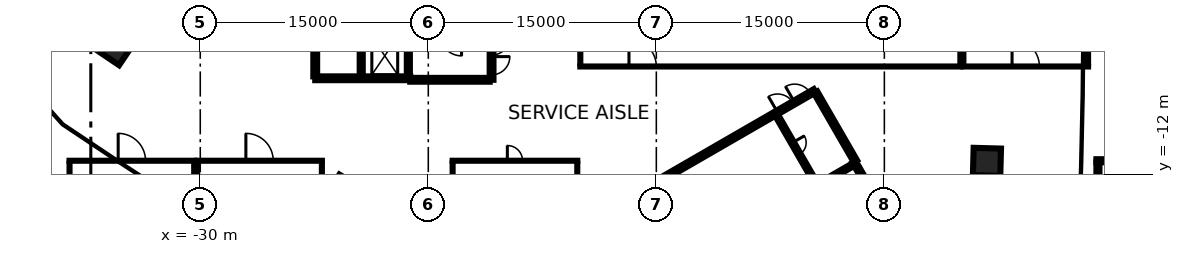
"""IFC4 building model, lengths in metres.
Left out: names, types, materials, properties, quantities, classifications, styles, units other than length and angle.
Written with IfcOpenShell. Run it as: python <this file> out.ifc"""

import sys

from ifc_helpers import new_model, si_unit, direction, frame, frame_2d, origin, origin_2d, place, context, subcontext, project, spatial, rectangle, extrude, element, fill, save


model = new_model("IFC4")
c1 = context("Model", 3, precision=1e-05, world=origin(), true_north=direction((0.0, 1.0)))
c2 = subcontext(c1, "Body", "Model", "MODEL_VIEW")
j1 = project(units=[si_unit("LENGTHUNIT", "METRE"), si_unit("PLANEANGLEUNIT", "RADIAN")], contexts=[c1])
p1 = place(None, origin())
s1 = spatial("IfcSite", under=j1, at=p1, CompositionType="ELEMENT")
p2 = place(p1, origin())
s2 = spatial("IfcBuilding", under=s1, at=p2, CompositionType="ELEMENT")
p3 = place(p2, frame((0.0, 0.0, -12.0)))
s3 = spatial("IfcBuildingStorey", under=s2, at=p3, CompositionType="ELEMENT", Elevation=-12.0)
for number, where, z_axis, x_axis in (
    (1, (21.749, -11.174, 0.0), (0.0, 0.0, 1.0), (-1.0, 0.027, 0.0)),
    (2, (-35.583, -3.565, 0.0), (0.0, 0.0, 1.0), (0.559, 0.829, 0.0)),
):
    element("IfcColumn", number, at=place(p3, frame(where, z_axis=z_axis, x_axis=x_axis)), inside=s3, PredefinedType="COLUMN", context=c2, shape_type="SweptSolid", body=[
        extrude(rectangle(XDim=1.8, YDim=1.8, at=origin_2d()), origin(), (0.0, 0.0, 1.0), 4.4),
    ])
p4 = place(p3, frame((-10.837, 5.775, 0.0), z_axis=(0.0, 0.0, 1.0), x_axis=(0.0, -1.0, 0.0)))
e3 = element("IfcWall", 3, at=p4, inside=s3, PredefinedType="SHEAR", context=c2, shape_type="SweptSolid", body=[
    extrude(rectangle(XDim=11.55, YDim=0.25, at=frame_2d((5.775, 0.0))), origin(), (0.0, 0.0, 1.0), 4.4),
])
p5 = place(p4, frame((10.025, 0.0, 0.0)))
e4 = element("IfcOpeningElement", 4, at=p5, cuts=e3, PredefinedType="OPENING", context=c2, shape_type="SweptSolid", body=[
    extrude(rectangle(XDim=1.2, YDim=2.1, at=frame_2d((0.6, 1.05))), frame((0.0, 0.135, 0.0), z_axis=(0.0, -1.0, 0.0), x_axis=(1.0, 0.0, 0.0)), (0.0, 0.0, 1.0), 0.27),
])
p6 = place(p4, frame((8.725, 0.0, 0.0)))
e5 = element("IfcOpeningElement", 5, at=p6, cuts=e3, PredefinedType="OPENING", context=c2, shape_type="SweptSolid", body=[
    extrude(rectangle(XDim=1.2, YDim=2.1, at=frame_2d((0.6, 1.05))), frame((0.0, 0.135, 0.0), z_axis=(0.0, -1.0, 0.0), x_axis=(1.0, 0.0, 0.0)), (0.0, 0.0, 1.0), 0.27),
])
p7 = place(p3, frame((-16.187, -5.675, 0.0), z_axis=(0.0, 0.0, 1.0), x_axis=(-1.0, 0.0, 0.0)))
e6 = element("IfcWall", 6, at=p7, inside=s3, PredefinedType="SHEAR", context=c2, shape_type="SweptSolid", body=[
    extrude(rectangle(XDim=6.25, YDim=0.25, at=frame_2d((3.125, 0.0))), origin(), (0.0, 0.0, 1.0), 4.4),
])
p8 = place(p3, frame((-10.963, -5.775, 0.0), z_axis=(0.0, 0.0, 1.0), x_axis=(-1.0, 0.0, 0.0)))
e7 = element("IfcWall", 7, at=p8, inside=s3, PredefinedType="SHEAR", context=c2, shape_type="SweptSolid", body=[
    extrude(rectangle(XDim=5.225, YDim=0.25, at=frame_2d((2.612, 0.0))), origin(), (0.0, 0.0, 1.0), 4.4),
])
p9 = place(p3, frame((-22.437, -5.55, 0.0), z_axis=(0.0, 0.0, 1.0), x_axis=(0.0, 1.0, 0.0)))
e8 = element("IfcWall", 8, at=p9, inside=s3, PredefinedType="SHEAR", context=c2, shape_type="SweptSolid", body=[
    extrude(rectangle(XDim=1.849, YDim=0.25, at=frame_2d((0.925, 0.0))), origin(), (0.0, 0.0, 1.0), 4.4),
])
p10 = place(p3, frame((-16.312, -2.807, 0.0), z_axis=(0.0, 0.0, 1.0), x_axis=(0.0, -1.0, 0.0)))
e9 = element("IfcWall", 9, at=p10, inside=s3, PredefinedType="SHEAR", context=c2, shape_type="SweptSolid", body=[
    extrude(rectangle(XDim=2.742, YDim=0.2, at=frame_2d((1.371, 0.0))), origin(), (0.0, 0.0, 1.0), 4.4),
])
p11 = place(p10, frame((0.743, 0.0, 0.0)))
e10 = element("IfcOpeningElement", 10, at=p11, cuts=e9, PredefinedType="OPENING", context=c2, shape_type="SweptSolid", body=[
    extrude(rectangle(XDim=1.3, YDim=2.1, at=frame_2d((0.65, 1.05))), frame((0.0, 0.11, 0.0), z_axis=(0.0, -1.0, 0.0), x_axis=(1.0, 0.0, 0.0)), (0.0, 0.0, 1.0), 0.22),
])
p12 = place(p3, frame((-19.412, -5.549, 0.0), z_axis=(0.0, 0.0, 1.0), x_axis=(0.0, 1.0, 0.0)))
e11 = element("IfcWall", 11, at=p12, inside=s3, PredefinedType="SHEAR", context=c2, shape_type="SweptSolid", body=[
    extrude(rectangle(XDim=2.799, YDim=0.2, at=frame_2d((1.399, 0.0))), origin(), (0.0, 0.0, 1.0), 4.4),
])
p13 = place(p3, frame((0.417, -12.273, 0.0), z_axis=(0.0, 0.0, 1.0), x_axis=(0.866021906294, 0.500006057782, 0.0)))
e12 = element("IfcWall", 12, at=p13, inside=s3, PredefinedType="SHEAR", context=c2, shape_type="SweptSolid", body=[
    extrude(rectangle(XDim=11.55, YDim=0.25, at=frame_2d((5.775, 0.0))), origin(), (0.0, 0.0, 1.0), 4.4),
])
p14 = place(p13, frame((10.025, 0.0, 0.0)))
e13 = element("IfcOpeningElement", 13, at=p14, cuts=e12, PredefinedType="OPENING", context=c2, shape_type="SweptSolid", body=[
    extrude(rectangle(XDim=1.2, YDim=2.1, at=frame_2d((0.6, 1.05))), frame((0.0, 0.135, 0.0), z_axis=(0.0, -1.0, 0.0), x_axis=(1.0, 0.0, 0.0)), (0.0, 0.0, 1.0), 0.27),
])
p15 = place(p13, frame((8.725, 0.0, 0.0)))
e14 = element("IfcOpeningElement", 14, at=p15, cuts=e12, PredefinedType="OPENING", context=c2, shape_type="SweptSolid", body=[
    extrude(rectangle(XDim=1.2, YDim=2.1, at=frame_2d((0.6, 1.05))), frame((0.0, 0.135, 0.0), z_axis=(0.0, -1.0, 0.0), x_axis=(1.0, 0.0, 0.0)), (0.0, 0.0, 1.0), 0.27),
])
p16 = place(p3, frame((13.008, -11.181, 0.0), z_axis=(0.0, 0.0, 1.0), x_axis=(0.500004234368, -0.866022959057, 0.0)))
e15 = element("IfcWall", 15, at=p16, inside=s3, PredefinedType="SHEAR", context=c2, shape_type="SweptSolid", body=[
    extrude(rectangle(XDim=6.25, YDim=0.25, at=frame_2d((3.125, 0.0))), origin(), (0.0, 0.0, 1.0), 4.4),
])
p17 = place(p3, frame((10.483, -6.606, 0.0), z_axis=(0.0, 0.0, 1.0), x_axis=(0.49999885962, -0.866026062182, 0.0)))
e16 = element("IfcWall", 16, at=p17, inside=s3, PredefinedType="SHEAR", context=c2, shape_type="SweptSolid", body=[
    extrude(rectangle(XDim=5.225, YDim=0.25, at=frame_2d((2.612, 0.0))), origin(), (0.0, 0.0, 1.0), 4.4),
])
p18 = place(p3, frame((7.906, -8.094, 0.0), z_axis=(0.0, 0.0, 1.0), x_axis=(0.500012186204, -0.866018367962, 0.0)))
e17 = element("IfcWall", 17, at=p18, inside=s3, PredefinedType="SHEAR", context=c2, shape_type="SweptSolid", body=[
    extrude(rectangle(XDim=5.349, YDim=0.2, at=frame_2d((2.674, 0.0))), origin(), (0.0, 0.0, 1.0), 4.4),
])
p19 = place(p18, frame((2.099, 0.0, 0.0)))
e18 = element("IfcOpeningElement", 18, at=p19, cuts=e17, PredefinedType="OPENING", context=c2, shape_type="SweptSolid", body=[
    extrude(rectangle(XDim=0.9, YDim=2.1, at=frame_2d((0.45, 1.05))), frame((0.0, 0.11, 0.0), z_axis=(0.0, -1.0, 0.0), x_axis=(1.0, 0.0, 0.0)), (0.0, 0.0, 1.0), 0.22),
])
p20 = place(p3, frame((10.668, -12.677, 0.0), z_axis=(0.0, 0.0, 1.0), x_axis=(0.866016748302, 0.500014991436, 0.0)))
e19 = element("IfcWall", 19, at=p20, inside=s3, PredefinedType="SHEAR", context=c2, shape_type="SweptSolid", body=[
    extrude(rectangle(XDim=2.649, YDim=0.2, at=frame_2d((1.324, 0.0))), origin(), (0.0, 0.0, 1.0), 4.4),
])
p21 = place(p20, frame((0.65, 0.0, 0.0)))
e20 = element("IfcOpeningElement", 20, at=p21, cuts=e19, PredefinedType="OPENING", context=c2, shape_type="SweptSolid", body=[
    extrude(rectangle(XDim=1.3, YDim=2.1, at=frame_2d((0.65, 1.05))), frame((0.0, 0.11, 0.0), z_axis=(0.0, -1.0, 0.0), x_axis=(1.0, 0.0, 0.0)), (0.0, 0.0, 1.0), 0.22),
])
p22 = place(p3, frame((-38.7, -11.1, 0.0), z_axis=(0.0, 0.0, 1.0), x_axis=(1.0, 0.0, 0.0)))
e21 = element("IfcWall", 21, at=p22, inside=s3, PredefinedType="PARTITIONING", context=c2, shape_type="SweptSolid", body=[
    extrude(rectangle(XDim=8.4, YDim=0.2, at=frame_2d((4.2, 0.0))), origin(), (0.0, 0.0, 1.0), 4.4),
])
p23 = place(p22, frame((3.3, 0.0, 0.0)))
e22 = element("IfcOpeningElement", 22, at=p23, cuts=e21, PredefinedType="OPENING", context=c2, shape_type="SweptSolid", body=[
    extrude(rectangle(XDim=1.8, YDim=2.1, at=frame_2d((0.9, 1.05))), frame((0.0, 0.11, 0.0), z_axis=(0.0, -1.0, 0.0), x_axis=(1.0, 0.0, 0.0)), (0.0, 0.0, 1.0), 0.22),
])
p24 = place(p3, frame((-38.6, -15.4, 0.0), z_axis=(0.0, 0.0, 1.0), x_axis=(0.0, 1.0, 0.0)))
e23 = element("IfcWall", 23, at=p24, inside=s3, PredefinedType="PARTITIONING", context=c2, shape_type="SweptSolid", body=[
    extrude(rectangle(XDim=4.2, YDim=0.2, at=frame_2d((2.1, 0.0))), origin(), (0.0, 0.0, 1.0), 4.4),
])
p25 = place(p3, frame((-30.4, -15.6, 0.0), z_axis=(0.0, 0.0, 1.0), x_axis=(0.0, 1.0, 0.0)))
e24 = element("IfcWall", 24, at=p25, inside=s3, PredefinedType="PARTITIONING", context=c2, shape_type="SweptSolid", body=[
    extrude(rectangle(XDim=4.4, YDim=0.2, at=frame_2d((2.2, 0.0))), origin(), (0.0, 0.0, 1.0), 4.4),
])
p26 = place(p3, frame((-30.3, -11.1, 0.0), z_axis=(0.0, 0.0, 1.0), x_axis=(1.0, 0.0, 0.0)))
e25 = element("IfcWall", 25, at=p26, inside=s3, PredefinedType="PARTITIONING", context=c2, shape_type="SweptSolid", body=[
    extrude(rectangle(XDim=8.4, YDim=0.2, at=frame_2d((4.2, 0.0))), origin(), (0.0, 0.0, 1.0), 4.4),
])
p27 = place(p26, frame((3.3, 0.0, 0.0)))
e26 = element("IfcOpeningElement", 26, at=p27, cuts=e25, PredefinedType="OPENING", context=c2, shape_type="SweptSolid", body=[
    extrude(rectangle(XDim=1.8, YDim=2.1, at=frame_2d((0.9, 1.05))), frame((0.0, 0.11, 0.0), z_axis=(0.0, -1.0, 0.0), x_axis=(1.0, 0.0, 0.0)), (0.0, 0.0, 1.0), 0.22),
])
p28 = place(p3, frame((-30.2, -15.6, 0.0), z_axis=(0.0, 0.0, 1.0), x_axis=(0.0, 1.0, 0.0)))
e27 = element("IfcWall", 27, at=p28, inside=s3, PredefinedType="PARTITIONING", context=c2, shape_type="SweptSolid", body=[
    extrude(rectangle(XDim=4.4, YDim=0.2, at=frame_2d((2.2, 0.0))), origin(), (0.0, 0.0, 1.0), 4.4),
])
p29 = place(p3, frame((-22.0, -15.4, 0.0), z_axis=(0.0, 0.0, 1.0), x_axis=(0.0, 1.0, 0.0)))
e28 = element("IfcWall", 28, at=p29, inside=s3, PredefinedType="PARTITIONING", context=c2, shape_type="SweptSolid", body=[
    extrude(rectangle(XDim=4.2, YDim=0.2, at=frame_2d((2.1, 0.0))), origin(), (0.0, 0.0, 1.0), 4.4),
])
p30 = place(p3, frame((-13.5, -11.1, 0.0), z_axis=(0.0, 0.0, 1.0), x_axis=(1.0, 0.0, 0.0)))
e29 = element("IfcWall", 29, at=p30, inside=s3, PredefinedType="PARTITIONING", context=c2, shape_type="SweptSolid", body=[
    extrude(rectangle(XDim=8.4, YDim=0.2, at=frame_2d((4.2, 0.0))), origin(), (0.0, 0.0, 1.0), 4.4),
])
p31 = place(p30, frame((3.7, 0.0, 0.0)))
e30 = element("IfcOpeningElement", 30, at=p31, cuts=e29, PredefinedType="OPENING", context=c2, shape_type="SweptSolid", body=[
    extrude(rectangle(XDim=1.0, YDim=2.1, at=frame_2d((0.5, 1.05))), frame((0.0, 0.11, 0.0), z_axis=(0.0, -1.0, 0.0), x_axis=(1.0, 0.0, 0.0)), (0.0, 0.0, 1.0), 0.22),
])
for number, where, z_axis, x_axis in (
    (31, (-13.4, -15.4, 0.0), (0.0, 0.0, 1.0), (0.0, 1.0, 0.0)),
    (32, (-5.2, -15.4, 0.0), (0.0, 0.0, 1.0), (0.0, 1.0, 0.0)),
):
    element("IfcWall", number, at=place(p3, frame(where, z_axis=z_axis, x_axis=x_axis)), inside=s3, PredefinedType="PARTITIONING", context=c2, shape_type="SweptSolid", body=[
        extrude(rectangle(XDim=4.2, YDim=0.2, at=frame_2d((2.1, 0.0))), origin(), (0.0, 0.0, 1.0), 4.4),
    ])
p32 = place(p3, frame((-5.1, -4.9, 0.0), z_axis=(0.0, 0.0, 1.0), x_axis=(1.0, 0.0, 0.0)))
e33 = element("IfcWall", 33, at=p32, inside=s3, PredefinedType="PARTITIONING", context=c2, shape_type="SweptSolid", body=[
    extrude(rectangle(XDim=25.2, YDim=0.2, at=frame_2d((12.6, 0.0))), origin(), (0.0, 0.0, 1.0), 4.4),
])
p33 = place(p32, frame((3.3, 0.0, 0.0)))
e34 = element("IfcOpeningElement", 34, at=p33, cuts=e33, PredefinedType="OPENING", context=c2, shape_type="SweptSolid", body=[
    extrude(rectangle(XDim=1.8, YDim=2.1, at=frame_2d((0.9, 1.05))), frame((0.0, 0.11, 0.0), z_axis=(0.0, -1.0, 0.0), x_axis=(1.0, 0.0, 0.0)), (0.0, 0.0, 1.0), 0.22),
])
for number, where, z_axis, x_axis in (
    (35, (-5.0, -4.8, 0.0), (0.0, 0.0, 1.0), (0.0, 1.0, 0.0)),
    (36, (20.0, -4.8, 0.0), (0.0, 0.0, 1.0), (0.0, 1.0, 0.0)),
):
    element("IfcWall", number, at=place(p3, frame(where, z_axis=z_axis, x_axis=x_axis)), inside=s3, PredefinedType="PARTITIONING", context=c2, shape_type="SweptSolid", body=[
        extrude(rectangle(XDim=4.2, YDim=0.2, at=frame_2d((2.1, 0.0))), origin(), (0.0, 0.0, 1.0), 4.4),
    ])
p34 = place(p3, frame((20.1, -4.9, 0.0), z_axis=(0.0, 0.0, 1.0), x_axis=(1.0, 0.0, 0.0)))
e37 = element("IfcWall", 37, at=p34, inside=s3, PredefinedType="PARTITIONING", context=c2, shape_type="SweptSolid", body=[
    extrude(rectangle(XDim=8.4, YDim=0.2, at=frame_2d((4.2, 0.0))), origin(), (0.0, 0.0, 1.0), 4.4),
])
p35 = place(p34, frame((3.3, 0.0, 0.0)))
e38 = element("IfcOpeningElement", 38, at=p35, cuts=e37, PredefinedType="OPENING", context=c2, shape_type="SweptSolid", body=[
    extrude(rectangle(XDim=1.8, YDim=2.1, at=frame_2d((0.9, 1.05))), frame((0.0, 0.11, 0.0), z_axis=(0.0, -1.0, 0.0), x_axis=(1.0, 0.0, 0.0)), (0.0, 0.0, 1.0), 0.22),
])
p36 = place(p3, frame((20.2, -4.8, 0.0), z_axis=(0.0, 0.0, 1.0), x_axis=(0.0, 1.0, 0.0)))
e39 = element("IfcWall", 39, at=p36, inside=s3, PredefinedType="PARTITIONING", context=c2, shape_type="SweptSolid", body=[
    extrude(rectangle(XDim=4.2, YDim=0.2, at=frame_2d((2.1, 0.0))), origin(), (0.0, 0.0, 1.0), 4.4),
])
p37 = place(p3, frame((28.4, -4.8, 0.0), z_axis=(0.0, 0.0, 1.0), x_axis=(0.0, 1.0, 0.0)))
e40 = element("IfcWall", 40, at=p37, inside=s3, PredefinedType="PARTITIONING", context=c2, shape_type="SweptSolid", body=[
    extrude(rectangle(XDim=4.4, YDim=0.2, at=frame_2d((2.2, 0.0))), origin(), (0.0, 0.0, 1.0), 4.4),
])
p38 = place(p3, frame((29.05, -20.8, 0.0), z_axis=(0.0, 0.0, 1.0), x_axis=(0.0, 1.0, 0.0)))
e41 = element("IfcWall", 41, at=p38, inside=s3, PredefinedType="SOLIDWALL", context=c2, shape_type="SweptSolid", body=[
    extrude(rectangle(XDim=9.6, YDim=0.2, at=frame_2d((4.8, 0.0))), origin(), (0.0, 0.0, 1.0), 4.4),
])
p39 = place(p3, frame((28.95, -11.1, 0.0), z_axis=(0.0, 0.0, 1.0), x_axis=(1.0, 0.0, 0.0)))
e42 = element("IfcWall", 42, at=p39, inside=s3, PredefinedType="SOLIDWALL", context=c2, shape_type="SweptSolid", body=[
    extrude(rectangle(XDim=4.55, YDim=0.2, at=frame_2d((2.275, 0.0))), origin(), (0.0, 0.0, 1.0), 4.4),
])
p40 = place(p11, origin())
e43 = element("IfcDoor", 43, at=p40, inside=s3, OperationType="SLIDING_TO_RIGHT", PredefinedType="DOOR", context=c2, shape_type="SweptSolid", body=[
    extrude(rectangle(XDim=1.3, YDim=2.1, at=frame_2d((0.65, 1.05))), frame((0.0, 0.025, 0.0), z_axis=(0.0, -1.0, 0.0), x_axis=(1.0, 0.0, 0.0)), (0.0, 0.0, 1.0), 0.05),
])
fill(e10, e43)
p41 = place(p5, origin())
e44 = element("IfcDoor", 44, at=p41, inside=s3, OperationType="SINGLE_SWING_LEFT", PredefinedType="DOOR", context=c2, shape_type="SweptSolid", body=[
    extrude(rectangle(XDim=1.2, YDim=2.1, at=frame_2d((0.6, 1.05))), frame((0.0, 0.025, 0.0), z_axis=(0.0, -1.0, 0.0), x_axis=(1.0, 0.0, 0.0)), (0.0, 0.0, 1.0), 0.05),
])
fill(e4, e44)
p42 = place(p6, origin())
e45 = element("IfcDoor", 45, at=p42, inside=s3, OperationType="SINGLE_SWING_RIGHT", PredefinedType="DOOR", context=c2, shape_type="SweptSolid", body=[
    extrude(rectangle(XDim=1.2, YDim=2.1, at=frame_2d((0.6, 1.05))), frame((0.0, 0.025, 0.0), z_axis=(0.0, -1.0, 0.0), x_axis=(1.0, 0.0, 0.0)), (0.0, 0.0, 1.0), 0.05),
])
fill(e5, e45)
p43 = place(p21, origin())
e46 = element("IfcDoor", 46, at=p43, inside=s3, OperationType="SLIDING_TO_LEFT", PredefinedType="DOOR", context=c2, shape_type="SweptSolid", body=[
    extrude(rectangle(XDim=1.3, YDim=2.1, at=frame_2d((0.65, 1.05))), frame((0.0, 0.025, 0.0), z_axis=(0.0, -1.0, 0.0), x_axis=(1.0, 0.0, 0.0)), (0.0, 0.0, 1.0), 0.05),
])
fill(e20, e46)
p44 = place(p14, origin())
e47 = element("IfcDoor", 47, at=p44, inside=s3, OperationType="SINGLE_SWING_LEFT", PredefinedType="DOOR", context=c2, shape_type="SweptSolid", body=[
    extrude(rectangle(XDim=1.2, YDim=2.1, at=frame_2d((0.6, 1.05))), frame((0.0, 0.025, 0.0), z_axis=(0.0, -1.0, 0.0), x_axis=(1.0, 0.0, 0.0)), (0.0, 0.0, 1.0), 0.05),
])
fill(e13, e47)
p45 = place(p15, origin())
e48 = element("IfcDoor", 48, at=p45, inside=s3, OperationType="SINGLE_SWING_RIGHT", PredefinedType="DOOR", context=c2, shape_type="SweptSolid", body=[
    extrude(rectangle(XDim=1.2, YDim=2.1, at=frame_2d((0.6, 1.05))), frame((0.0, 0.025, 0.0), z_axis=(0.0, -1.0, 0.0), x_axis=(1.0, 0.0, 0.0)), (0.0, 0.0, 1.0), 0.05),
])
fill(e14, e48)
p46 = place(p19, origin())
e49 = element("IfcDoor", 49, at=p46, inside=s3, OperationType="SINGLE_SWING_LEFT", PredefinedType="DOOR", context=c2, shape_type="SweptSolid", body=[
    extrude(rectangle(XDim=0.9, YDim=2.1, at=frame_2d((0.45, 1.05))), frame((0.0, 0.025, 0.0), z_axis=(0.0, -1.0, 0.0), x_axis=(1.0, 0.0, 0.0)), (0.0, 0.0, 1.0), 0.05),
])
fill(e18, e49)
p47 = place(p23, origin())
e50 = element("IfcDoor", 50, at=p47, inside=s3, OperationType="DOUBLE_DOOR_SINGLE_SWING", PredefinedType="DOOR", context=c2, shape_type="SweptSolid", body=[
    extrude(rectangle(XDim=1.8, YDim=2.1, at=frame_2d((0.9, 1.05))), frame((0.0, 0.025, 0.0), z_axis=(0.0, -1.0, 0.0), x_axis=(1.0, 0.0, 0.0)), (0.0, 0.0, 1.0), 0.05),
])
fill(e22, e50)
p48 = place(p27, origin())
e51 = element("IfcDoor", 51, at=p48, inside=s3, OperationType="DOUBLE_DOOR_SINGLE_SWING", PredefinedType="DOOR", context=c2, shape_type="SweptSolid", body=[
    extrude(rectangle(XDim=1.8, YDim=2.1, at=frame_2d((0.9, 1.05))), frame((0.0, 0.025, 0.0), z_axis=(0.0, -1.0, 0.0), x_axis=(1.0, 0.0, 0.0)), (0.0, 0.0, 1.0), 0.05),
])
fill(e26, e51)
p49 = place(p31, origin())
e52 = element("IfcDoor", 52, at=p49, inside=s3, OperationType="SINGLE_SWING_LEFT", PredefinedType="DOOR", context=c2, shape_type="SweptSolid", body=[
    extrude(rectangle(XDim=1.0, YDim=2.1, at=frame_2d((0.5, 1.05))), frame((0.0, 0.025, 0.0), z_axis=(0.0, -1.0, 0.0), x_axis=(1.0, 0.0, 0.0)), (0.0, 0.0, 1.0), 0.05),
])
fill(e30, e52)
p50 = place(p33, origin())
e53 = element("IfcDoor", 53, at=p50, inside=s3, OperationType="DOUBLE_DOOR_SINGLE_SWING", PredefinedType="DOOR", context=c2, shape_type="SweptSolid", body=[
    extrude(rectangle(XDim=1.8, YDim=2.1, at=frame_2d((0.9, 1.05))), frame((0.0, 0.025, 0.0), z_axis=(0.0, -1.0, 0.0), x_axis=(1.0, 0.0, 0.0)), (0.0, 0.0, 1.0), 0.05),
])
fill(e34, e53)
p51 = place(p35, origin())
e54 = element("IfcDoor", 54, at=p51, inside=s3, OperationType="DOUBLE_DOOR_SINGLE_SWING", PredefinedType="DOOR", context=c2, shape_type="SweptSolid", body=[
    extrude(rectangle(XDim=1.8, YDim=2.1, at=frame_2d((0.9, 1.05))), frame((0.0, 0.025, 0.0), z_axis=(0.0, -1.0, 0.0), x_axis=(1.0, 0.0, 0.0)), (0.0, 0.0, 1.0), 0.05),
])
fill(e38, e54)
save(model, sys.argv[1])
